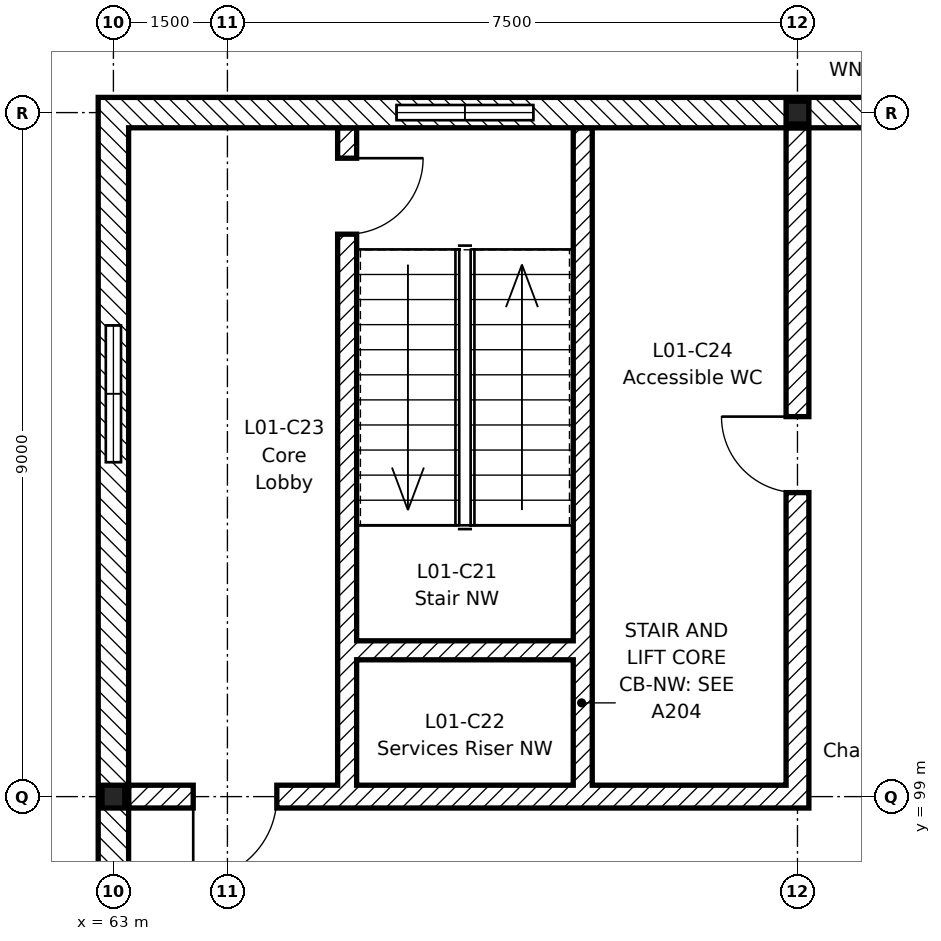
"""IFC4 building model, lengths in metres.
Left out: names, types, materials, properties, quantities, classifications, styles, units other than length and angle.
Written with IfcOpenShell. Run it as: python <this file> out.ifc"""

import sys

from ifc_helpers import new_model, si_unit, direction, frame, frame_2d, origin, origin_2d, place, context, subcontext, project, spatial, rectangle, i_section, extrude, element, fill, save


model = new_model("IFC4")
c1 = context("Model", 3, precision=1e-05, world=origin(), true_north=direction((0.0, 1.0)))
c2 = subcontext(c1, "Body", "Model", "MODEL_VIEW")
j1 = project(units=[si_unit("LENGTHUNIT", "METRE"), si_unit("PLANEANGLEUNIT", "RADIAN")], contexts=[c1])
p1 = place(None, origin())
s1 = spatial("IfcSite", under=j1, at=p1, CompositionType="ELEMENT")
p2 = place(p1, origin())
s2 = spatial("IfcBuilding", under=s1, at=p2, CompositionType="ELEMENT")
p3 = place(p2, frame((0.0, 0.0, 5.4)))
s3 = spatial("IfcBuildingStorey", under=s2, at=p3, CompositionType="ELEMENT", Elevation=5.4)
for number, where, z_axis, x_axis in (
    (1, (72.0, 108.0, -0.2), (0.0, 0.0, 1.0), (1.0, 0.0, 0.0)),
    (2, (63.0, 99.0, -0.2), (0.0, 0.0, 1.0), (1.0, 0.0, 0.0)),
):
    element("IfcColumn", number, at=place(p3, frame(where, z_axis=z_axis, x_axis=x_axis)), inside=s3, PredefinedType="COLUMN", context=c2, shape_type="SweptSolid", body=[
        extrude(i_section(OverallWidth=0.3, OverallDepth=0.3, WebThickness=0.011, FlangeThickness=0.019, FilletRadius=0.027, at=origin_2d()), origin(), (0.0, 0.0, 1.0), 4.5),
    ])
p4 = place(p3, frame((75.015, 98.35, 0.0), z_axis=(0.0, 0.0, 1.0), x_axis=(-0.707106781187, -0.707106781187, 0.0)))
e3 = element("IfcWall", 3, at=p4, inside=s3, PredefinedType="PARTITIONING", context=c2, shape_type="SweptSolid", body=[
    extrude(rectangle(XDim=3.344, YDim=0.3, at=frame_2d((1.672, 0.0))), origin(), (0.0, 0.0, 1.0), 2.5),
])
p5 = place(p3, frame((63.2, 99.0, 0.0), z_axis=(0.0, 0.0, 1.0), x_axis=(1.0, 0.0, 0.0)))
e4 = element("IfcWall", 4, at=p5, inside=s3, PredefinedType="SHEAR", context=c2, shape_type="SweptSolid", body=[
    extrude(rectangle(XDim=8.95, YDim=0.3, at=frame_2d((4.475, 0.0))), origin(), (0.0, 0.0, 1.0), 4.3),
])
p6 = place(p5, frame((0.85, 0.0, 0.0)))
e5 = element("IfcOpeningElement", 5, at=p6, cuts=e4, PredefinedType="OPENING", context=c2, shape_type="SweptSolid", body=[
    extrude(rectangle(XDim=1.1, YDim=2.1, at=frame_2d((0.55, 1.05))), frame((0.0, 0.16, 0.0), z_axis=(0.0, -1.0, 0.0), x_axis=(1.0, 0.0, 0.0)), (0.0, 0.0, 1.0), 0.32),
])
p7 = place(p3, frame((72.0, 107.8, 0.0), z_axis=(0.0, 0.0, 1.0), x_axis=(0.0, -1.0, 0.0)))
e6 = element("IfcWall", 6, at=p7, inside=s3, PredefinedType="SHEAR", context=c2, shape_type="SweptSolid", body=[
    extrude(rectangle(XDim=8.65, YDim=0.3, at=frame_2d((4.325, 0.0))), origin(), (0.0, 0.0, 1.0), 4.3),
])
p8 = place(p7, frame((3.8, 0.0, 0.0)))
e7 = element("IfcOpeningElement", 7, at=p8, cuts=e6, PredefinedType="OPENING", context=c2, shape_type="SweptSolid", body=[
    extrude(rectangle(XDim=1.0, YDim=2.1, at=frame_2d((0.5, 1.05))), frame((0.0, 0.16, 0.0), z_axis=(0.0, -1.0, 0.0), x_axis=(1.0, 0.0, 0.0)), (0.0, 0.0, 1.0), 0.32),
])
p9 = place(p3, frame((66.075, 107.8, 0.0), z_axis=(0.0, 0.0, 1.0), x_axis=(0.0, -1.0, 0.0)))
e8 = element("IfcWall", 8, at=p9, inside=s3, PredefinedType="SHEAR", context=c2, shape_type="SweptSolid", body=[
    extrude(rectangle(XDim=8.65, YDim=0.25, at=frame_2d((4.325, 0.0))), origin(), (0.0, 0.0, 1.0), 4.3),
])
p10 = place(p9, frame((0.4, 0.0, 0.0)))
e9 = element("IfcOpeningElement", 9, at=p10, cuts=e8, PredefinedType="OPENING", context=c2, shape_type="SweptSolid", body=[
    extrude(rectangle(XDim=1.0, YDim=2.1, at=frame_2d((0.5, 1.05))), frame((0.0, 0.135, 0.0), z_axis=(0.0, -1.0, 0.0), x_axis=(1.0, 0.0, 0.0)), (0.0, 0.0, 1.0), 0.27),
])
p11 = place(p3, frame((69.175, 107.8, 0.0), z_axis=(0.0, 0.0, 1.0), x_axis=(0.0, -1.0, 0.0)))
e10 = element("IfcWall", 10, at=p11, inside=s3, PredefinedType="SHEAR", context=c2, shape_type="SweptSolid", body=[
    extrude(rectangle(XDim=8.65, YDim=0.25, at=frame_2d((4.325, 0.0))), origin(), (0.0, 0.0, 1.0), 4.3),
])
p12 = place(p3, frame((66.2, 100.925, 0.0), z_axis=(0.0, 0.0, 1.0), x_axis=(1.0, 0.0, 0.0)))
e11 = element("IfcWall", 11, at=p12, inside=s3, PredefinedType="SHEAR", context=c2, shape_type="SweptSolid", body=[
    extrude(rectangle(XDim=2.85, YDim=0.25, at=frame_2d((1.425, 0.0))), origin(), (0.0, 0.0, 1.0), 4.3),
])
p13 = place(p3, frame((62.8, 108.0, 0.0), z_axis=(0.0, 0.0, 1.0), x_axis=(1.0, 0.0, 0.0)))
e12 = element("IfcWall", 12, at=p13, inside=s3, PredefinedType="STANDARD", context=c2, shape_type="SweptSolid", body=[
    extrude(rectangle(XDim=3.925, YDim=0.4, at=frame_2d((1.962, 0.0))), origin(), (0.0, 0.0, 1.0), 4.3),
])
p14 = place(p3, frame((68.525, 108.0, 0.0), z_axis=(0.0, 0.0, 1.0), x_axis=(1.0, 0.0, 0.0)))
e13 = element("IfcWall", 13, at=p14, inside=s3, PredefinedType="STANDARD", context=c2, shape_type="SweptSolid", body=[
    extrude(rectangle(XDim=3.475, YDim=0.4, at=frame_2d((1.738, 0.0))), origin(), (0.0, 0.0, 1.0), 4.3),
])
p15 = place(p3, frame((66.725, 108.0, 0.0), z_axis=(0.0, 0.0, 1.0), x_axis=(1.0, 0.0, 0.0)))
e14 = element("IfcWall", 14, at=p15, inside=s3, PredefinedType="STANDARD", context=c2, shape_type="SweptSolid", body=[
    extrude(rectangle(XDim=1.8, YDim=0.4, at=frame_2d((0.9, 0.0))), origin(), (0.0, 0.0, 1.0), 0.9),
])
p16 = place(p3, frame((72.0, 108.0, 0.0), z_axis=(0.0, 0.0, 1.0), x_axis=(1.0, 0.0, 0.0)))
e15 = element("IfcWall", 15, at=p16, inside=s3, PredefinedType="STANDARD", context=c2, shape_type="SweptSolid", body=[
    extrude(rectangle(XDim=27.0, YDim=0.4, at=frame_2d((13.5, 0.0))), origin(), (0.0, 0.0, 1.0), 3.81),
])
p17 = place(p16, frame((0.9, 0.0, 0.9)))
e16 = element("IfcOpeningElement", 16, at=p17, cuts=e15, PredefinedType="OPENING", context=c2, shape_type="SweptSolid", body=[
    extrude(rectangle(XDim=1.2, YDim=2.4, at=frame_2d((0.6, 1.2))), frame((0.0, 0.21, 0.0), z_axis=(0.0, -1.0, 0.0), x_axis=(1.0, 0.0, 0.0)), (0.0, 0.0, 1.0), 0.42),
])
p18 = place(p16, frame((3.9, 0.0, 0.9)))
e17 = element("IfcOpeningElement", 17, at=p18, cuts=e15, PredefinedType="OPENING", context=c2, shape_type="SweptSolid", body=[
    extrude(rectangle(XDim=1.2, YDim=2.4, at=frame_2d((0.6, 1.2))), frame((0.0, 0.21, 0.0), z_axis=(0.0, -1.0, 0.0), x_axis=(1.0, 0.0, 0.0)), (0.0, 0.0, 1.0), 0.42),
])
p19 = place(p16, frame((6.9, 0.0, 0.9)))
e18 = element("IfcOpeningElement", 18, at=p19, cuts=e15, PredefinedType="OPENING", context=c2, shape_type="SweptSolid", body=[
    extrude(rectangle(XDim=1.2, YDim=2.4, at=frame_2d((0.6, 1.2))), frame((0.0, 0.21, 0.0), z_axis=(0.0, -1.0, 0.0), x_axis=(1.0, 0.0, 0.0)), (0.0, 0.0, 1.0), 0.42),
])
p20 = place(p16, frame((9.9, 0.0, 0.9)))
e19 = element("IfcOpeningElement", 19, at=p20, cuts=e15, PredefinedType="OPENING", context=c2, shape_type="SweptSolid", body=[
    extrude(rectangle(XDim=1.2, YDim=2.4, at=frame_2d((0.6, 1.2))), frame((0.0, 0.21, 0.0), z_axis=(0.0, -1.0, 0.0), x_axis=(1.0, 0.0, 0.0)), (0.0, 0.0, 1.0), 0.42),
])
p21 = place(p16, frame((12.9, 0.0, 0.9)))
e20 = element("IfcOpeningElement", 20, at=p21, cuts=e15, PredefinedType="OPENING", context=c2, shape_type="SweptSolid", body=[
    extrude(rectangle(XDim=1.2, YDim=2.4, at=frame_2d((0.6, 1.2))), frame((0.0, 0.21, 0.0), z_axis=(0.0, -1.0, 0.0), x_axis=(1.0, 0.0, 0.0)), (0.0, 0.0, 1.0), 0.42),
])
p22 = place(p16, frame((15.9, 0.0, 0.9)))
e21 = element("IfcOpeningElement", 21, at=p22, cuts=e15, PredefinedType="OPENING", context=c2, shape_type="SweptSolid", body=[
    extrude(rectangle(XDim=1.2, YDim=2.4, at=frame_2d((0.6, 1.2))), frame((0.0, 0.21, 0.0), z_axis=(0.0, -1.0, 0.0), x_axis=(1.0, 0.0, 0.0)), (0.0, 0.0, 1.0), 0.42),
])
p23 = place(p16, frame((18.9, 0.0, 0.9)))
e22 = element("IfcOpeningElement", 22, at=p23, cuts=e15, PredefinedType="OPENING", context=c2, shape_type="SweptSolid", body=[
    extrude(rectangle(XDim=1.2, YDim=2.4, at=frame_2d((0.6, 1.2))), frame((0.0, 0.21, 0.0), z_axis=(0.0, -1.0, 0.0), x_axis=(1.0, 0.0, 0.0)), (0.0, 0.0, 1.0), 0.42),
])
p24 = place(p16, frame((21.9, 0.0, 0.9)))
e23 = element("IfcOpeningElement", 23, at=p24, cuts=e15, PredefinedType="OPENING", context=c2, shape_type="SweptSolid", body=[
    extrude(rectangle(XDim=1.2, YDim=2.4, at=frame_2d((0.6, 1.2))), frame((0.0, 0.21, 0.0), z_axis=(0.0, -1.0, 0.0), x_axis=(1.0, 0.0, 0.0)), (0.0, 0.0, 1.0), 0.42),
])
p25 = place(p16, frame((24.9, 0.0, 0.9)))
e24 = element("IfcOpeningElement", 24, at=p25, cuts=e15, PredefinedType="OPENING", context=c2, shape_type="SweptSolid", body=[
    extrude(rectangle(XDim=1.2, YDim=2.4, at=frame_2d((0.6, 1.2))), frame((0.0, 0.21, 0.0), z_axis=(0.0, -1.0, 0.0), x_axis=(1.0, 0.0, 0.0)), (0.0, 0.0, 1.0), 0.42),
])
p26 = place(p3, frame((63.0, 72.0, 0.0), z_axis=(0.0, 0.0, 1.0), x_axis=(0.0, 1.0, 0.0)))
e25 = element("IfcWall", 25, at=p26, inside=s3, PredefinedType="STANDARD", context=c2, shape_type="SweptSolid", body=[
    extrude(rectangle(XDim=27.0, YDim=0.4, at=frame_2d((13.5, 0.0))), origin(), (0.0, 0.0, 1.0), 3.81),
])
p27 = place(p26, frame((0.9, 0.0, 0.9)))
e26 = element("IfcOpeningElement", 26, at=p27, cuts=e25, PredefinedType="OPENING", context=c2, shape_type="SweptSolid", body=[
    extrude(rectangle(XDim=1.2, YDim=2.4, at=frame_2d((0.6, 1.2))), frame((0.0, 0.21, 0.0), z_axis=(0.0, -1.0, 0.0), x_axis=(1.0, 0.0, 0.0)), (0.0, 0.0, 1.0), 0.42),
])
p28 = place(p26, frame((3.9, 0.0, 0.9)))
e27 = element("IfcOpeningElement", 27, at=p28, cuts=e25, PredefinedType="OPENING", context=c2, shape_type="SweptSolid", body=[
    extrude(rectangle(XDim=1.2, YDim=2.4, at=frame_2d((0.6, 1.2))), frame((0.0, 0.21, 0.0), z_axis=(0.0, -1.0, 0.0), x_axis=(1.0, 0.0, 0.0)), (0.0, 0.0, 1.0), 0.42),
])
p29 = place(p26, frame((6.9, 0.0, 0.9)))
e28 = element("IfcOpeningElement", 28, at=p29, cuts=e25, PredefinedType="OPENING", context=c2, shape_type="SweptSolid", body=[
    extrude(rectangle(XDim=1.2, YDim=2.4, at=frame_2d((0.6, 1.2))), frame((0.0, 0.21, 0.0), z_axis=(0.0, -1.0, 0.0), x_axis=(1.0, 0.0, 0.0)), (0.0, 0.0, 1.0), 0.42),
])
p30 = place(p26, frame((9.9, 0.0, 0.9)))
e29 = element("IfcOpeningElement", 29, at=p30, cuts=e25, PredefinedType="OPENING", context=c2, shape_type="SweptSolid", body=[
    extrude(rectangle(XDim=1.2, YDim=2.4, at=frame_2d((0.6, 1.2))), frame((0.0, 0.21, 0.0), z_axis=(0.0, -1.0, 0.0), x_axis=(1.0, 0.0, 0.0)), (0.0, 0.0, 1.0), 0.42),
])
p31 = place(p26, frame((12.9, 0.0, 0.9)))
e30 = element("IfcOpeningElement", 30, at=p31, cuts=e25, PredefinedType="OPENING", context=c2, shape_type="SweptSolid", body=[
    extrude(rectangle(XDim=1.2, YDim=2.4, at=frame_2d((0.6, 1.2))), frame((0.0, 0.21, 0.0), z_axis=(0.0, -1.0, 0.0), x_axis=(1.0, 0.0, 0.0)), (0.0, 0.0, 1.0), 0.42),
])
p32 = place(p26, frame((15.9, 0.0, 0.9)))
e31 = element("IfcOpeningElement", 31, at=p32, cuts=e25, PredefinedType="OPENING", context=c2, shape_type="SweptSolid", body=[
    extrude(rectangle(XDim=1.2, YDim=2.4, at=frame_2d((0.6, 1.2))), frame((0.0, 0.21, 0.0), z_axis=(0.0, -1.0, 0.0), x_axis=(1.0, 0.0, 0.0)), (0.0, 0.0, 1.0), 0.42),
])
p33 = place(p26, frame((18.9, 0.0, 0.9)))
e32 = element("IfcOpeningElement", 32, at=p33, cuts=e25, PredefinedType="OPENING", context=c2, shape_type="SweptSolid", body=[
    extrude(rectangle(XDim=1.2, YDim=2.4, at=frame_2d((0.6, 1.2))), frame((0.0, 0.21, 0.0), z_axis=(0.0, -1.0, 0.0), x_axis=(1.0, 0.0, 0.0)), (0.0, 0.0, 1.0), 0.42),
])
p34 = place(p26, frame((21.9, 0.0, 0.9)))
e33 = element("IfcOpeningElement", 33, at=p34, cuts=e25, PredefinedType="OPENING", context=c2, shape_type="SweptSolid", body=[
    extrude(rectangle(XDim=1.2, YDim=2.4, at=frame_2d((0.6, 1.2))), frame((0.0, 0.21, 0.0), z_axis=(0.0, -1.0, 0.0), x_axis=(1.0, 0.0, 0.0)), (0.0, 0.0, 1.0), 0.42),
])
p35 = place(p26, frame((24.9, 0.0, 0.9)))
e34 = element("IfcOpeningElement", 34, at=p35, cuts=e25, PredefinedType="OPENING", context=c2, shape_type="SweptSolid", body=[
    extrude(rectangle(XDim=1.2, YDim=2.4, at=frame_2d((0.6, 1.2))), frame((0.0, 0.21, 0.0), z_axis=(0.0, -1.0, 0.0), x_axis=(1.0, 0.0, 0.0)), (0.0, 0.0, 1.0), 0.42),
])
p36 = place(p3, frame((63.0, 99.0, 0.0), z_axis=(0.0, 0.0, 1.0), x_axis=(0.0, 1.0, 0.0)))
e35 = element("IfcWall", 35, at=p36, inside=s3, PredefinedType="STANDARD", context=c2, shape_type="SweptSolid", body=[
    extrude(rectangle(XDim=4.4, YDim=0.4, at=frame_2d((2.2, 0.0))), origin(), (0.0, 0.0, 1.0), 4.3),
])
p37 = place(p3, frame((63.0, 105.2, 0.0), z_axis=(0.0, 0.0, 1.0), x_axis=(0.0, 1.0, 0.0)))
e36 = element("IfcWall", 36, at=p37, inside=s3, PredefinedType="STANDARD", context=c2, shape_type="SweptSolid", body=[
    extrude(rectangle(XDim=2.6, YDim=0.4, at=frame_2d((1.3, 0.0))), origin(), (0.0, 0.0, 1.0), 4.3),
])
p38 = place(p3, frame((63.0, 103.4, 0.0), z_axis=(0.0, 0.0, 1.0), x_axis=(0.0, 1.0, 0.0)))
e37 = element("IfcWall", 37, at=p38, inside=s3, PredefinedType="STANDARD", context=c2, shape_type="SweptSolid", body=[
    extrude(rectangle(XDim=1.8, YDim=0.4, at=frame_2d((0.9, 0.0))), origin(), (0.0, 0.0, 1.0), 0.9),
])
p39 = place(p10, origin())
e38 = element("IfcDoor", 38, at=p39, inside=s3, OperationType="SINGLE_SWING_LEFT", PredefinedType="DOOR", context=c2, shape_type="SweptSolid", body=[
    extrude(rectangle(XDim=1.0, YDim=2.1, at=frame_2d((0.5, 1.05))), frame((0.0, 0.025, 0.0), z_axis=(0.0, -1.0, 0.0), x_axis=(1.0, 0.0, 0.0)), (0.0, 0.0, 1.0), 0.05),
])
fill(e9, e38)
p40 = place(p6, frame((1.1, 0.0, 0.0), z_axis=(0.0, 0.0, 1.0), x_axis=(-1.0, 0.0, 0.0)))
e39 = element("IfcDoor", 39, at=p40, inside=s3, OperationType="SINGLE_SWING_RIGHT", PredefinedType="DOOR", context=c2, shape_type="SweptSolid", body=[
    extrude(rectangle(XDim=1.1, YDim=2.1, at=frame_2d((0.55, 1.05))), frame((0.0, 0.025, 0.0), z_axis=(0.0, -1.0, 0.0), x_axis=(1.0, 0.0, 0.0)), (0.0, 0.0, 1.0), 0.05),
])
fill(e5, e39)
p41 = place(p8, frame((1.0, 0.0, 0.0), z_axis=(0.0, 0.0, 1.0), x_axis=(-1.0, 0.0, 0.0)))
e40 = element("IfcDoor", 40, at=p41, inside=s3, OperationType="SINGLE_SWING_RIGHT", PredefinedType="DOOR", context=c2, shape_type="SweptSolid", body=[
    extrude(rectangle(XDim=1.0, YDim=2.1, at=frame_2d((0.5, 1.05))), frame((0.0, 0.025, 0.0), z_axis=(0.0, -1.0, 0.0), x_axis=(1.0, 0.0, 0.0)), (0.0, 0.0, 1.0), 0.05),
])
fill(e7, e40)
save(model, sys.argv[1])
